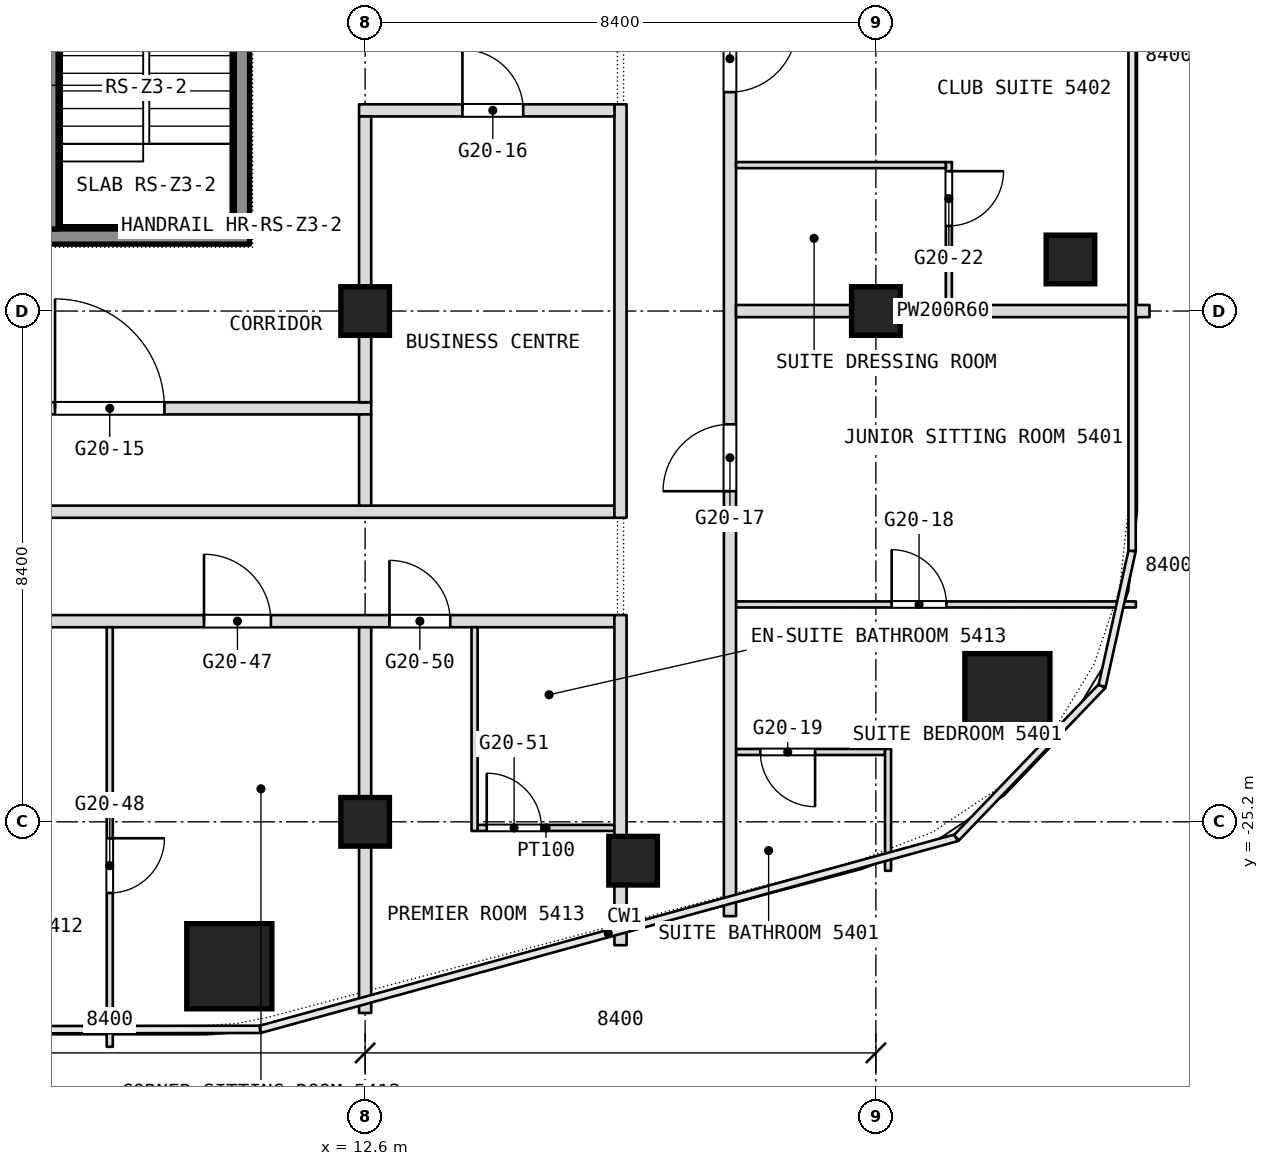
"""IFC4 building model, lengths in metres.
Left out: names, types, materials, properties, quantities, classifications, styles, units other than length and angle.
Written with IfcOpenShell. Run it as: python <this file> out.ifc"""

import sys

from ifc_helpers import new_model, si_unit, direction, frame, frame_2d, origin, origin_2d, place, context, subcontext, project, spatial, rectangle, extrude, element, fill, save


model = new_model("IFC4")
c1 = context("Model", 3, precision=1e-05, world=origin(), true_north=direction((0.0, 1.0)))
c2 = subcontext(c1, "Body", "Model", "MODEL_VIEW")
j1 = project(units=[si_unit("LENGTHUNIT", "METRE"), si_unit("PLANEANGLEUNIT", "RADIAN")], contexts=[c1])
p1 = place(None, origin())
s1 = spatial("IfcSite", under=j1, at=p1, CompositionType="ELEMENT")
p2 = place(p1, origin())
s2 = spatial("IfcBuilding", under=s1, at=p2, CompositionType="ELEMENT")
p3 = place(p2, frame((0.0, 0.0, 230.9)))
s3 = spatial("IfcBuildingStorey", under=s2, at=p3, CompositionType="ELEMENT", Elevation=230.9)
for number, where, z_axis, x_axis in (
    (1, (10.366, -27.575, 0.0), (0.0, 0.0, 1.0), (1.0, 0.0, 0.0)),
    (2, (23.163, -23.133, 0.0), (0.0, 0.0, 1.0), (1.0, 0.0, 0.0)),
):
    element("IfcColumn", number, at=place(p3, frame(where, z_axis=z_axis, x_axis=x_axis)), inside=s3, PredefinedType="COLUMN", context=c2, shape_type="SweptSolid", body=[
        extrude(rectangle(XDim=1.4, YDim=1.4, at=origin_2d()), origin(), (0.0, 0.0, 1.0), 3.6),
    ])
for number, where, z_axis, x_axis in (
    (3, (12.6, -25.2, 0.0), (0.0, 0.0, 1.0), (1.0, 0.0, 0.0)),
    (4, (12.6, -16.8, 0.0), (0.0, 0.0, 1.0), (1.0, 0.0, 0.0)),
    (5, (21.0, -16.8, 0.0), (0.0, 0.0, 1.0), (1.0, 0.0, 0.0)),
    (6, (24.2, -15.952, 0.0), (0.0, 0.0, 1.0), (1.0, 0.0, 0.0)),
    (7, (17.007, -25.839, 0.0), (0.0, 0.0, 1.0), (1.0, 0.0, 0.0)),
):
    element("IfcColumn", number, at=place(p3, frame(where, z_axis=z_axis, x_axis=x_axis)), inside=s3, PredefinedType="COLUMN", context=c2, shape_type="SweptSolid", body=[
        extrude(rectangle(XDim=0.8, YDim=0.8, at=origin_2d()), origin(), (0.0, 0.0, 1.0), 3.6),
    ])
p4 = place(p3, frame((14.45, -25.3, 0.0), z_axis=(0.0, 0.0, 1.0), x_axis=(1.0, 0.0, 0.0)))
e8 = element("IfcWall", 8, at=p4, inside=s3, PredefinedType="PARTITIONING", context=c2, shape_type="SweptSolid", body=[
    extrude(rectangle(XDim=2.25, YDim=0.1, at=frame_2d((1.125, 0.0))), origin(), (0.0, 0.0, 1.0), 2.94),
])
p5 = place(p4, frame((0.15, 0.0, 0.0)))
e9 = element("IfcOpeningElement", 9, at=p5, cuts=e8, PredefinedType="OPENING", context=c2, shape_type="SweptSolid", body=[
    extrude(rectangle(XDim=0.9, YDim=2.1, at=frame_2d((0.45, 1.05))), frame((0.0, 0.05, 0.0), z_axis=(0.0, -1.0, 0.0), x_axis=(1.0, 0.0, 0.0)), (0.0, 0.0, 1.0), 0.1),
])
p6 = place(p3, frame((18.7, -24.051, 0.0), z_axis=(0.0, 0.0, 1.0), x_axis=(1.0, 0.0, 0.0)))
e10 = element("IfcWall", 10, at=p6, inside=s3, PredefinedType="PARTITIONING", context=c2, shape_type="SweptSolid", body=[
    extrude(rectangle(XDim=2.45, YDim=0.1, at=frame_2d((1.225, 0.0))), origin(), (0.0, 0.0, 1.0), 3.34),
])
p7 = place(p6, frame((0.4, 0.0, 0.0)))
e11 = element("IfcOpeningElement", 11, at=p7, cuts=e10, PredefinedType="OPENING", context=c2, shape_type="SweptSolid", body=[
    extrude(rectangle(XDim=0.9, YDim=2.1, at=frame_2d((0.45, 1.05))), frame((0.0, 0.05, 0.0), z_axis=(0.0, -1.0, 0.0), x_axis=(1.0, 0.0, 0.0)), (0.0, 0.0, 1.0), 0.1),
])
p8 = place(p3, frame((22.2, -16.7, 0.0), z_axis=(0.0, 0.0, 1.0), x_axis=(0.0, 1.0, 0.0)))
e12 = element("IfcWall", 12, at=p8, inside=s3, PredefinedType="PARTITIONING", context=c2, shape_type="SweptSolid", body=[
    extrude(rectangle(XDim=2.35, YDim=0.1, at=frame_2d((1.175, 0.0))), origin(), (0.0, 0.0, 1.0), 3.34),
])
p9 = place(p8, frame((1.3, 0.0, 0.0)))
e13 = element("IfcOpeningElement", 13, at=p9, cuts=e12, PredefinedType="OPENING", context=c2, shape_type="SweptSolid", body=[
    extrude(rectangle(XDim=0.9, YDim=2.1, at=frame_2d((0.45, 1.05))), frame((0.0, 0.05, 0.0), z_axis=(0.0, -1.0, 0.0), x_axis=(1.0, 0.0, 0.0)), (0.0, 0.0, 1.0), 0.1),
])
p10 = place(p3, frame((-16.7, -21.9, 0.0), z_axis=(0.0, 0.0, 1.0), x_axis=(1.0, 0.0, 0.0)))
e14 = element("IfcWall", 14, at=p10, inside=s3, PredefinedType="PARTITIONING", context=c2, shape_type="SweptSolid", body=[
    extrude(rectangle(XDim=33.4, YDim=0.2, at=frame_2d((16.7, 0.0))), origin(), (0.0, 0.0, 1.0), 3.34),
])
p11 = place(p10, frame((0.3, 0.0, 0.0)))
e15 = element("IfcOpeningElement", 15, at=p11, cuts=e14, PredefinedType="OPENING", context=c2, shape_type="SweptSolid", body=[
    extrude(rectangle(XDim=1.0, YDim=2.1, at=frame_2d((0.5, 1.05))), frame((0.0, 0.1, 0.0), z_axis=(0.0, -1.0, 0.0), x_axis=(1.0, 0.0, 0.0)), (0.0, 0.0, 1.0), 0.2),
])
p12 = place(p10, frame((9.85, 0.0, 0.0)))
e16 = element("IfcOpeningElement", 16, at=p12, cuts=e14, PredefinedType="OPENING", context=c2, shape_type="SweptSolid", body=[
    extrude(rectangle(XDim=1.1, YDim=2.1, at=frame_2d((0.55, 1.05))), frame((0.0, 0.1, 0.0), z_axis=(0.0, -1.0, 0.0), x_axis=(1.0, 0.0, 0.0)), (0.0, 0.0, 1.0), 0.2),
])
p13 = place(p10, frame((12.9, 0.0, 0.0)))
e17 = element("IfcOpeningElement", 17, at=p13, cuts=e14, PredefinedType="OPENING", context=c2, shape_type="SweptSolid", body=[
    extrude(rectangle(XDim=1.0, YDim=2.1, at=frame_2d((0.5, 1.05))), frame((0.0, 0.1, 0.0), z_axis=(0.0, -1.0, 0.0), x_axis=(1.0, 0.0, 0.0)), (0.0, 0.0, 1.0), 0.2),
])
p14 = place(p10, frame((19.5, 0.0, 0.0)))
e18 = element("IfcOpeningElement", 18, at=p14, cuts=e14, PredefinedType="OPENING", context=c2, shape_type="SweptSolid", body=[
    extrude(rectangle(XDim=1.0, YDim=2.1, at=frame_2d((0.5, 1.05))), frame((0.0, 0.1, 0.0), z_axis=(0.0, -1.0, 0.0), x_axis=(1.0, 0.0, 0.0)), (0.0, 0.0, 1.0), 0.2),
])
p15 = place(p10, frame((26.65, 0.0, 0.0)))
e19 = element("IfcOpeningElement", 19, at=p15, cuts=e14, PredefinedType="OPENING", context=c2, shape_type="SweptSolid", body=[
    extrude(rectangle(XDim=1.1, YDim=2.1, at=frame_2d((0.55, 1.05))), frame((0.0, 0.1, 0.0), z_axis=(0.0, -1.0, 0.0), x_axis=(1.0, 0.0, 0.0)), (0.0, 0.0, 1.0), 0.2),
])
p16 = place(p10, frame((29.7, 0.0, 0.0)))
e20 = element("IfcOpeningElement", 20, at=p16, cuts=e14, PredefinedType="OPENING", context=c2, shape_type="SweptSolid", body=[
    extrude(rectangle(XDim=1.0, YDim=2.1, at=frame_2d((0.5, 1.05))), frame((0.0, 0.1, 0.0), z_axis=(0.0, -1.0, 0.0), x_axis=(1.0, 0.0, 0.0)), (0.0, 0.0, 1.0), 0.2),
])
p17 = place(p3, frame((18.7, -21.625, 0.0), z_axis=(0.0, 0.0, 1.0), x_axis=(1.0, 0.0, 0.0)))
e21 = element("IfcWall", 21, at=p17, inside=s3, PredefinedType="PARTITIONING", context=c2, shape_type="SweptSolid", body=[
    extrude(rectangle(XDim=6.576, YDim=0.1, at=frame_2d((3.288, 0.0))), origin(), (0.0, 0.0, 1.0), 3.34),
])
p18 = place(p17, frame((2.56, 0.0, 0.0)))
e22 = element("IfcOpeningElement", 22, at=p18, cuts=e21, PredefinedType="OPENING", context=c2, shape_type="SweptSolid", body=[
    extrude(rectangle(XDim=0.9, YDim=2.1, at=frame_2d((0.45, 1.05))), frame((0.0, 0.05, 0.0), z_axis=(0.0, -1.0, 0.0), x_axis=(1.0, 0.0, 0.0)), (0.0, 0.0, 1.0), 0.1),
])
p19 = place(p3, frame((21.2, -26.005, 0.0), z_axis=(0.0, 0.0, 1.0), x_axis=(0.0, 1.0, 0.0)))
e23 = element("IfcWall", 23, at=p19, inside=s3, PredefinedType="PARTITIONING", context=c2, shape_type="SweptSolid", body=[
    extrude(rectangle(XDim=2.004, YDim=0.1, at=frame_2d((1.002, 0.0))), origin(), (0.0, 0.0, 1.0), 3.34),
])
p20 = place(p3, frame((-16.7, -20.1, 0.0), z_axis=(0.0, 0.0, 1.0), x_axis=(1.0, 0.0, 0.0)))
e24 = element("IfcWall", 24, at=p20, inside=s3, PredefinedType="PARTITIONING", context=c2, shape_type="SweptSolid", body=[
    extrude(rectangle(XDim=33.4, YDim=0.2, at=frame_2d((16.7, 0.0))), origin(), (0.0, 0.0, 1.0), 3.34),
])
p21 = place(p3, frame((18.6, -26.751, 0.0), z_axis=(0.0, 0.0, 1.0), x_axis=(0.0, 1.0, 0.0)))
e25 = element("IfcWall", 25, at=p21, inside=s3, PredefinedType="PARTITIONING", context=c2, shape_type="SweptSolid", body=[
    extrude(rectangle(XDim=49.091, YDim=0.2, at=frame_2d((24.545, 0.0))), origin(), (0.0, 0.0, 1.0), 3.34),
])
p22 = place(p21, frame((6.988, 0.0, 0.0)))
e26 = element("IfcOpeningElement", 26, at=p22, cuts=e25, PredefinedType="OPENING", context=c2, shape_type="SweptSolid", body=[
    extrude(rectangle(XDim=1.1, YDim=2.1, at=frame_2d((0.55, 1.05))), frame((0.0, 0.1, 0.0), z_axis=(0.0, -1.0, 0.0), x_axis=(1.0, 0.0, 0.0)), (0.0, 0.0, 1.0), 0.2),
])
p23 = place(p21, frame((13.551, 0.0, 0.0)))
e27 = element("IfcOpeningElement", 27, at=p23, cuts=e25, PredefinedType="OPENING", context=c2, shape_type="SweptSolid", body=[
    extrude(rectangle(XDim=1.1, YDim=2.1, at=frame_2d((0.55, 1.05))), frame((0.0, 0.1, 0.0), z_axis=(0.0, -1.0, 0.0), x_axis=(1.0, 0.0, 0.0)), (0.0, 0.0, 1.0), 0.2),
])
p24 = place(p21, frame((22.051, 0.0, 0.0)))
e28 = element("IfcOpeningElement", 28, at=p24, cuts=e25, PredefinedType="OPENING", context=c2, shape_type="SweptSolid", body=[
    extrude(rectangle(XDim=1.1, YDim=2.1, at=frame_2d((0.55, 1.05))), frame((0.0, 0.1, 0.0), z_axis=(0.0, -1.0, 0.0), x_axis=(1.0, 0.0, 0.0)), (0.0, 0.0, 1.0), 0.2),
])
p25 = place(p21, frame((28.301, 0.0, 0.0)))
e29 = element("IfcOpeningElement", 29, at=p25, cuts=e25, PredefinedType="OPENING", context=c2, shape_type="SweptSolid", body=[
    extrude(rectangle(XDim=1.1, YDim=2.1, at=frame_2d((0.55, 1.05))), frame((0.0, 0.1, 0.0), z_axis=(0.0, -1.0, 0.0), x_axis=(1.0, 0.0, 0.0)), (0.0, 0.0, 1.0), 0.2),
])
p26 = place(p21, frame((37.951, 0.0, 0.0)))
e30 = element("IfcOpeningElement", 30, at=p26, cuts=e25, PredefinedType="OPENING", context=c2, shape_type="SweptSolid", body=[
    extrude(rectangle(XDim=1.0, YDim=2.1, at=frame_2d((0.5, 1.05))), frame((0.0, 0.1, 0.0), z_axis=(0.0, -1.0, 0.0), x_axis=(1.0, 0.0, 0.0)), (0.0, 0.0, 1.0), 0.2),
])
p27 = place(p21, frame((39.751, 0.0, 0.0)))
e31 = element("IfcOpeningElement", 31, at=p27, cuts=e25, PredefinedType="OPENING", context=c2, shape_type="SweptSolid", body=[
    extrude(rectangle(XDim=1.0, YDim=2.1, at=frame_2d((0.5, 1.05))), frame((0.0, 0.1, 0.0), z_axis=(0.0, -1.0, 0.0), x_axis=(1.0, 0.0, 0.0)), (0.0, 0.0, 1.0), 0.2),
])
p28 = place(p21, frame((44.051, 0.0, 0.0)))
e32 = element("IfcOpeningElement", 32, at=p28, cuts=e25, PredefinedType="OPENING", context=c2, shape_type="SweptSolid", body=[
    extrude(rectangle(XDim=1.0, YDim=2.1, at=frame_2d((0.5, 1.05))), frame((0.0, 0.1, 0.0), z_axis=(0.0, -1.0, 0.0), x_axis=(1.0, 0.0, 0.0)), (0.0, 0.0, 1.0), 0.2),
])
p29 = place(p3, frame((5.7, -18.4, 0.0), z_axis=(0.0, 0.0, 1.0), x_axis=(1.0, 0.0, 0.0)))
e33 = element("IfcWall", 33, at=p29, inside=s3, PredefinedType="PARTITIONING", context=c2, shape_type="SweptSolid", body=[
    extrude(rectangle(XDim=7.0, YDim=0.2, at=frame_2d((3.5, 0.0))), origin(), (0.0, 0.0, 1.0), 3.34),
])
p30 = place(p29, frame((1.8, 0.0, 0.0)))
e34 = element("IfcOpeningElement", 34, at=p30, cuts=e33, PredefinedType="OPENING", context=c2, shape_type="SweptSolid", body=[
    extrude(rectangle(XDim=1.8, YDim=2.1, at=frame_2d((0.9, 1.05))), frame((0.0, 0.1, 0.0), z_axis=(0.0, -1.0, 0.0), x_axis=(1.0, 0.0, 0.0)), (0.0, 0.0, 1.0), 0.2),
])
p31 = place(p3, frame((16.8, -27.229, 0.0), z_axis=(0.0, 0.0, 1.0), x_axis=(0.0, 1.0, 0.0)))
e35 = element("IfcWall", 35, at=p31, inside=s3, PredefinedType="PARTITIONING", context=c2, shape_type="SweptSolid", body=[
    extrude(rectangle(XDim=5.429, YDim=0.2, at=frame_2d((2.714, 0.0))), origin(), (0.0, 0.0, 1.0), 3.34),
])
p32 = place(p3, frame((16.8, -20.2, 0.0), z_axis=(0.0, 0.0, 1.0), x_axis=(0.0, 1.0, 0.0)))
e36 = element("IfcWall", 36, at=p32, inside=s3, PredefinedType="PARTITIONING", context=c2, shape_type="SweptSolid", body=[
    extrude(rectangle(XDim=6.8, YDim=0.2, at=frame_2d((3.4, 0.0))), origin(), (0.0, 0.0, 1.0), 3.34),
])
p33 = place(p3, frame((18.7, -16.8, 0.0), z_axis=(0.0, 0.0, 1.0), x_axis=(1.0, 0.0, 0.0)))
e37 = element("IfcWall", 37, at=p33, inside=s3, PredefinedType="PARTITIONING", context=c2, shape_type="SweptSolid", body=[
    extrude(rectangle(XDim=6.8, YDim=0.2, at=frame_2d((3.4, 0.0))), origin(), (0.0, 0.0, 1.0), 2.94),
])
p34 = place(p3, frame((14.4, -25.35, 0.0), z_axis=(0.0, 0.0, 1.0), x_axis=(0.0, 1.0, 0.0)))
e38 = element("IfcWall", 38, at=p34, inside=s3, PredefinedType="PARTITIONING", context=c2, shape_type="SweptSolid", body=[
    extrude(rectangle(XDim=3.35, YDim=0.1, at=frame_2d((1.675, 0.0))), origin(), (0.0, 0.0, 1.0), 3.34),
])
p35 = place(p3, frame((18.7, -14.4, 0.0), z_axis=(0.0, 0.0, 1.0), x_axis=(1.0, 0.0, 0.0)))
e39 = element("IfcWall", 39, at=p35, inside=s3, PredefinedType="PARTITIONING", context=c2, shape_type="SweptSolid", body=[
    extrude(rectangle(XDim=3.45, YDim=0.1, at=frame_2d((1.725, 0.0))), origin(), (0.0, 0.0, 1.0), 3.34),
])
p36 = place(p3, frame((12.5, -13.5, 0.0), z_axis=(0.0, 0.0, 1.0), x_axis=(1.0, 0.0, 0.0)))
e40 = element("IfcWall", 40, at=p36, inside=s3, PredefinedType="PARTITIONING", context=c2, shape_type="SweptSolid", body=[
    extrude(rectangle(XDim=4.2, YDim=0.2, at=frame_2d((2.1, 0.0))), origin(), (0.0, 0.0, 1.0), 3.34),
])
p37 = place(p36, frame((1.7, 0.0, 0.0)))
e41 = element("IfcOpeningElement", 41, at=p37, cuts=e40, PredefinedType="OPENING", context=c2, shape_type="SweptSolid", body=[
    extrude(rectangle(XDim=1.0, YDim=2.1, at=frame_2d((0.5, 1.05))), frame((0.0, 0.1, 0.0), z_axis=(0.0, -1.0, 0.0), x_axis=(1.0, 0.0, 0.0)), (0.0, 0.0, 1.0), 0.2),
])
p38 = place(p3, frame((12.6, -28.343, 0.0), z_axis=(0.0, 0.0, 1.0), x_axis=(0.0, 1.0, 0.0)))
e42 = element("IfcWall", 42, at=p38, inside=s3, PredefinedType="PARTITIONING", context=c2, shape_type="SweptSolid", body=[
    extrude(rectangle(XDim=6.343, YDim=0.2, at=frame_2d((3.171, 0.0))), origin(), (0.0, 0.0, 1.0), 3.34),
])
p39 = place(p3, frame((12.6, -20.0, 0.0), z_axis=(0.0, 0.0, 1.0), x_axis=(0.0, 1.0, 0.0)))
e43 = element("IfcWall", 43, at=p39, inside=s3, PredefinedType="PARTITIONING", context=c2, shape_type="SweptSolid", body=[
    extrude(rectangle(XDim=1.5, YDim=0.2, at=frame_2d((0.75, 0.0))), origin(), (0.0, 0.0, 1.0), 3.34),
])
p40 = place(p3, frame((12.6, -18.3, 0.0), z_axis=(0.0, 0.0, 1.0), x_axis=(0.0, 1.0, 0.0)))
e44 = element("IfcWall", 44, at=p40, inside=s3, PredefinedType="PARTITIONING", context=c2, shape_type="SweptSolid", body=[
    extrude(rectangle(XDim=4.7, YDim=0.2, at=frame_2d((2.35, 0.0))), origin(), (0.0, 0.0, 1.0), 3.34),
])
p41 = place(p3, frame((8.4, -28.9, 0.0), z_axis=(0.0, 0.0, 1.0), x_axis=(0.0, 1.0, 0.0)))
e45 = element("IfcWall", 45, at=p41, inside=s3, PredefinedType="PARTITIONING", context=c2, shape_type="SweptSolid", body=[
    extrude(rectangle(XDim=6.9, YDim=0.1, at=frame_2d((3.45, 0.0))), origin(), (0.0, 0.0, 1.0), 3.34),
])
p42 = place(p41, frame((2.53, 0.0, 0.0)))
e46 = element("IfcOpeningElement", 46, at=p42, cuts=e45, PredefinedType="OPENING", context=c2, shape_type="SweptSolid", body=[
    extrude(rectangle(XDim=0.9, YDim=2.1, at=frame_2d((0.45, 1.05))), frame((0.0, 0.05, 0.0), z_axis=(0.0, -1.0, 0.0), x_axis=(1.0, 0.0, 0.0)), (0.0, 0.0, 1.0), 0.1),
])
p43 = place(p3, frame((7.3, -15.575, 0.1), z_axis=(0.0, 0.0, 1.0), x_axis=(1.0, 0.0, 0.0)))
e47 = element("IfcWall", 47, at=p43, inside=s3, PredefinedType="SHEAR", context=c2, shape_type="SweptSolid", body=[
    extrude(rectangle(XDim=3.4, YDim=0.25, at=frame_2d((1.7, 0.0))), origin(), (0.0, 0.0, 1.0), 3.6),
])
for number, where, z_axis, x_axis in (
    (48, (7.425, -15.45, 0.1), (0.0, 0.0, 1.0), (0.0, 1.0, 0.0)),
    (49, (10.575, -15.45, 0.1), (0.0, 0.0, 1.0), (0.0, 1.0, 0.0)),
):
    element("IfcWall", number, at=place(p3, frame(where, z_axis=z_axis, x_axis=x_axis)), inside=s3, PredefinedType="SHEAR", context=c2, shape_type="SweptSolid", body=[
        extrude(rectangle(XDim=5.7, YDim=0.25, at=frame_2d((2.85, 0.0))), origin(), (0.0, 0.0, 1.0), 3.6),
    ])
p44 = place(p5, origin())
e50 = element("IfcDoor", 50, at=p44, inside=s3, OperationType="SINGLE_SWING_LEFT", PredefinedType="DOOR", context=c2, shape_type="SweptSolid", body=[
    extrude(rectangle(XDim=0.9, YDim=2.1, at=frame_2d((0.45, 1.05))), frame((0.0, 0.025, 0.0), z_axis=(0.0, -1.0, 0.0), x_axis=(1.0, 0.0, 0.0)), (0.0, 0.0, 1.0), 0.05),
])
fill(e9, e50)
p45 = place(p7, origin())
e51 = element("IfcDoor", 51, at=p45, inside=s3, OperationType="SINGLE_SWING_RIGHT", PredefinedType="DOOR", context=c2, shape_type="SweptSolid", body=[
    extrude(rectangle(XDim=0.9, YDim=2.1, at=frame_2d((0.45, 1.05))), frame((0.0, 0.025, 0.0), z_axis=(0.0, -1.0, 0.0), x_axis=(1.0, 0.0, 0.0)), (0.0, 0.0, 1.0), 0.05),
])
fill(e11, e51)
p46 = place(p9, origin())
e52 = element("IfcDoor", 52, at=p46, inside=s3, OperationType="SINGLE_SWING_RIGHT", PredefinedType="DOOR", context=c2, shape_type="SweptSolid", body=[
    extrude(rectangle(XDim=0.9, YDim=2.1, at=frame_2d((0.45, 1.05))), frame((0.0, 0.025, 0.0), z_axis=(0.0, -1.0, 0.0), x_axis=(1.0, 0.0, 0.0)), (0.0, 0.0, 1.0), 0.05),
])
fill(e13, e52)
p47 = place(p15, origin())
e53 = element("IfcDoor", 53, at=p47, inside=s3, OperationType="SINGLE_SWING_LEFT", PredefinedType="DOOR", context=c2, shape_type="SweptSolid", body=[
    extrude(rectangle(XDim=1.1, YDim=2.1, at=frame_2d((0.55, 1.05))), frame((0.0, 0.025, 0.0), z_axis=(0.0, -1.0, 0.0), x_axis=(1.0, 0.0, 0.0)), (0.0, 0.0, 1.0), 0.05),
])
fill(e19, e53)
p48 = place(p16, origin())
e54 = element("IfcDoor", 54, at=p48, inside=s3, OperationType="SINGLE_SWING_RIGHT", PredefinedType="DOOR", context=c2, shape_type="SweptSolid", body=[
    extrude(rectangle(XDim=1.0, YDim=2.1, at=frame_2d((0.5, 1.05))), frame((0.0, 0.025, 0.0), z_axis=(0.0, -1.0, 0.0), x_axis=(1.0, 0.0, 0.0)), (0.0, 0.0, 1.0), 0.05),
])
fill(e20, e54)
p49 = place(p18, origin())
e55 = element("IfcDoor", 55, at=p49, inside=s3, OperationType="SINGLE_SWING_LEFT", PredefinedType="DOOR", context=c2, shape_type="SweptSolid", body=[
    extrude(rectangle(XDim=0.9, YDim=2.1, at=frame_2d((0.45, 1.05))), frame((0.0, 0.025, 0.0), z_axis=(0.0, -1.0, 0.0), x_axis=(1.0, 0.0, 0.0)), (0.0, 0.0, 1.0), 0.05),
])
fill(e22, e55)
p50 = place(p22, origin())
e56 = element("IfcDoor", 56, at=p50, inside=s3, OperationType="SINGLE_SWING_LEFT", PredefinedType="DOOR", context=c2, shape_type="SweptSolid", body=[
    extrude(rectangle(XDim=1.1, YDim=2.1, at=frame_2d((0.55, 1.05))), frame((0.0, 0.025, 0.0), z_axis=(0.0, -1.0, 0.0), x_axis=(1.0, 0.0, 0.0)), (0.0, 0.0, 1.0), 0.05),
])
fill(e26, e56)
p51 = place(p23, origin())
e57 = element("IfcDoor", 57, at=p51, inside=s3, OperationType="SINGLE_SWING_LEFT", PredefinedType="DOOR", context=c2, shape_type="SweptSolid", body=[
    extrude(rectangle(XDim=1.1, YDim=2.1, at=frame_2d((0.55, 1.05))), frame((0.0, 0.025, 0.0), z_axis=(0.0, -1.0, 0.0), x_axis=(1.0, 0.0, 0.0)), (0.0, 0.0, 1.0), 0.05),
])
fill(e27, e57)
p52 = place(p30, origin())
e58 = element("IfcDoor", 58, at=p52, inside=s3, OperationType="DOUBLE_DOOR_SINGLE_SWING", PredefinedType="DOOR", context=c2, shape_type="SweptSolid", body=[
    extrude(rectangle(XDim=1.8, YDim=2.1, at=frame_2d((0.9, 1.05))), frame((0.0, 0.025, 0.0), z_axis=(0.0, -1.0, 0.0), x_axis=(1.0, 0.0, 0.0)), (0.0, 0.0, 1.0), 0.05),
])
fill(e34, e58)
p53 = place(p37, origin())
e59 = element("IfcDoor", 59, at=p53, inside=s3, OperationType="SINGLE_SWING_RIGHT", PredefinedType="DOOR", context=c2, shape_type="SweptSolid", body=[
    extrude(rectangle(XDim=1.0, YDim=2.1, at=frame_2d((0.5, 1.05))), frame((0.0, 0.025, 0.0), z_axis=(0.0, -1.0, 0.0), x_axis=(1.0, 0.0, 0.0)), (0.0, 0.0, 1.0), 0.05),
])
fill(e41, e59)
p54 = place(p42, origin())
e60 = element("IfcDoor", 60, at=p54, inside=s3, OperationType="SINGLE_SWING_LEFT", PredefinedType="DOOR", context=c2, shape_type="SweptSolid", body=[
    extrude(rectangle(XDim=0.9, YDim=2.1, at=frame_2d((0.45, 1.05))), frame((0.0, 0.025, 0.0), z_axis=(0.0, -1.0, 0.0), x_axis=(1.0, 0.0, 0.0)), (0.0, 0.0, 1.0), 0.05),
])
fill(e46, e60)
save(model, sys.argv[1])
